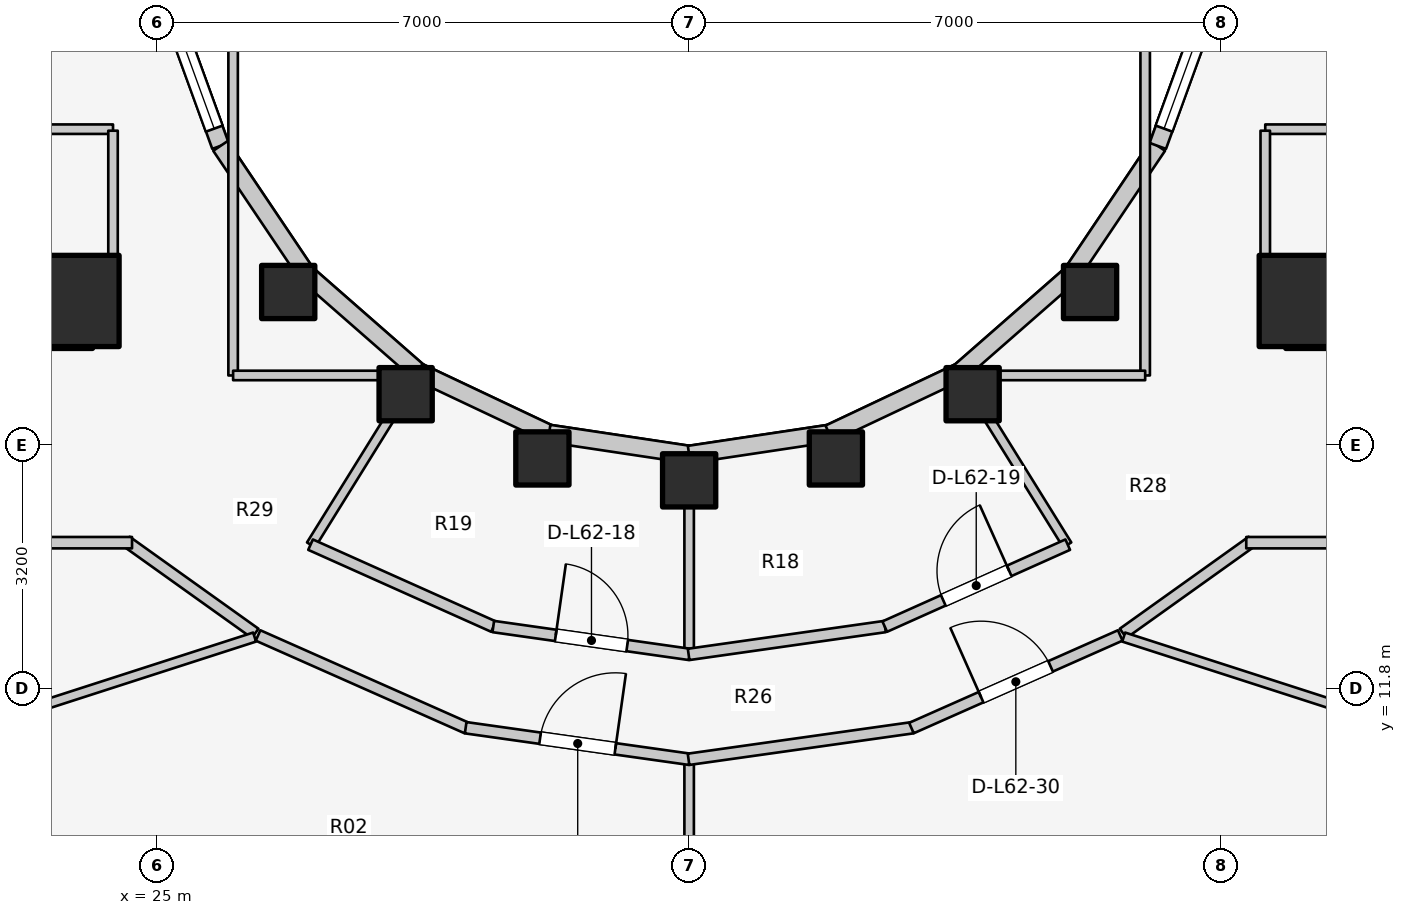
"""IFC4 building model, lengths in metres.
Left out: names, types, materials, properties, quantities, classifications, styles, units other than length and angle.
Written with IfcOpenShell. Run it as: python <this file> out.ifc"""

import sys

from ifc_helpers import new_model, si_unit, direction, frame, frame_2d, origin, origin_2d, place, context, subcontext, project, spatial, rectangle, extrude, element, fill, save


model = new_model("IFC4")
c1 = context("Model", 3, precision=1e-05, world=origin(), true_north=direction((0.0, 1.0)))
c2 = subcontext(c1, "Body", "Model", "MODEL_VIEW")
j1 = project(units=[si_unit("LENGTHUNIT", "METRE"), si_unit("PLANEANGLEUNIT", "RADIAN")], contexts=[c1])
p1 = place(None, origin())
s1 = spatial("IfcSite", under=j1, at=p1, CompositionType="ELEMENT")
p2 = place(p1, origin())
s2 = spatial("IfcBuilding", under=s1, at=p2, CompositionType="ELEMENT")
p3 = place(p2, frame((0.0, 0.0, 204.7)))
s3 = spatial("IfcBuildingStorey", under=s2, at=p3, CompositionType="ELEMENT", Elevation=204.7)
for number, where, z_axis, x_axis in (
    (1, (19.65, 16.55, 0.0), (0.0, 0.0, 1.0), (1.0, 0.0, 0.0)),
    (2, (39.85, 16.55, 0.0), (0.0, 0.0, 1.0), (1.0, 0.0, 0.0)),
):
    element("IfcWall", number, at=place(p3, frame(where, z_axis=z_axis, x_axis=x_axis)), inside=s3, PredefinedType="SHEAR", context=c2, shape_type="SweptSolid", body=[
        extrude(rectangle(XDim=4.5, YDim=0.55, at=frame_2d((2.25, 0.0))), origin(), (0.0, 0.0, 1.0), 3.1),
    ])
for number, where, z_axis, x_axis in (
    (3, (23.9, 16.9, 0.0), (0.0, 0.0, 1.0), (1.0, 0.0, 0.0)),
    (4, (40.1, 16.9, 0.0), (0.0, 0.0, 1.0), (1.0, 0.0, 0.0)),
):
    element("IfcColumn", number, at=place(p3, frame(where, z_axis=z_axis, x_axis=x_axis)), inside=s3, PredefinedType="COLUMN", context=c2, shape_type="SweptSolid", body=[
        extrude(rectangle(XDim=1.2, YDim=1.2, at=origin_2d()), origin(), (0.0, 0.0, 1.0), 3.1),
    ])
for number, where, z_axis, x_axis in (
    (5, (26.725, 17.018, 0.0), (0.0, 0.0, 1.0), (1.0, 0.0, 0.0)),
    (6, (28.27, 15.673, 0.0), (0.0, 0.0, 1.0), (1.0, 0.0, 0.0)),
    (7, (30.069, 14.828, 0.0), (0.0, 0.0, 1.0), (1.0, 0.0, 0.0)),
    (8, (32.0, 14.54, 0.0), (0.0, 0.0, 1.0), (1.0, 0.0, 0.0)),
    (9, (33.931, 14.828, 0.0), (0.0, 0.0, 1.0), (1.0, 0.0, 0.0)),
    (10, (35.73, 15.673, 0.0), (0.0, 0.0, 1.0), (1.0, 0.0, 0.0)),
    (11, (37.275, 17.018, 0.0), (0.0, 0.0, 1.0), (1.0, 0.0, 0.0)),
):
    element("IfcColumn", number, at=place(p3, frame(where, z_axis=z_axis, x_axis=x_axis)), inside=s3, PredefinedType="COLUMN", context=c2, shape_type="SweptSolid", body=[
        extrude(rectangle(XDim=0.7, YDim=0.7, at=origin_2d()), origin(), (0.0, 0.0, 1.0), 3.1),
    ])
p4 = place(p3, frame((25.123, 20.898, 0.0), z_axis=(0.0, 0.0, 1.0), x_axis=(0.341423187295, -0.93990968033, 0.0)))
e12 = element("IfcWall", 12, at=p4, inside=s3, PredefinedType="STANDARD", context=c2, shape_type="SweptSolid", body=[
    extrude(rectangle(XDim=2.084, YDim=0.23, at=frame_2d((1.042, 0.0))), origin(), (0.0, 0.0, 1.0), 2.84),
])
p5 = place(p4, frame((0.242, 0.0, 0.85)))
e13 = element("IfcOpeningElement", 13, at=p5, cuts=e12, PredefinedType="OPENING", context=c2, shape_type="SweptSolid", body=[
    extrude(rectangle(XDim=1.6, YDim=1.65, at=frame_2d((0.8, 0.825))), frame((0.0, 0.125, 0.0), z_axis=(0.0, -1.0, 0.0), x_axis=(1.0, 0.0, 0.0)), (0.0, 0.0, 1.0), 0.25),
])
p6 = place(p3, frame((25.834, 18.94, 0.0), z_axis=(0.0, 0.0, 1.0), x_axis=(0.558197800898, -0.829707909492, 0.0)))
e14 = element("IfcWall", 14, at=p6, inside=s3, PredefinedType="STANDARD", context=c2, shape_type="SweptSolid", body=[
    extrude(rectangle(XDim=2.027, YDim=0.23, at=frame_2d((1.013, 0.0))), origin(), (0.0, 0.0, 1.0), 2.16),
])
p7 = place(p3, frame((26.965, 17.258, 0.0), z_axis=(0.0, 0.0, 1.0), x_axis=(0.752576694707, -0.658504607869, 0.0)))
e15 = element("IfcWall", 15, at=p7, inside=s3, PredefinedType="STANDARD", context=c2, shape_type="SweptSolid", body=[
    extrude(rectangle(XDim=1.959, YDim=0.23, at=frame_2d((0.98, 0.0))), origin(), (0.0, 0.0, 1.0), 2.16),
])
p8 = place(p3, frame((28.44, 15.968, 0.0), z_axis=(0.0, 0.0, 1.0), x_axis=(0.904179699603, -0.427152280606, 0.0)))
e16 = element("IfcWall", 16, at=p8, inside=s3, PredefinedType="STANDARD", context=c2, shape_type="SweptSolid", body=[
    extrude(rectangle(XDim=1.899, YDim=0.23, at=frame_2d((0.95, 0.0))), origin(), (0.0, 0.0, 1.0), 2.16),
])
for number, where, z_axis, x_axis in (
    (17, (30.157, 15.157, 0.0), (0.0, 0.0, 1.0), (0.989, -0.149, 0.0)),
    (18, (32.0, 14.88, 0.0), (0.0, 0.0, 1.0), (0.989, 0.149, 0.0)),
):
    element("IfcWall", number, at=place(p3, frame(where, z_axis=z_axis, x_axis=x_axis)), inside=s3, PredefinedType="STANDARD", context=c2, shape_type="SweptSolid", body=[
        extrude(rectangle(XDim=1.864, YDim=0.23, at=frame_2d((0.932, 0.0))), origin(), (0.0, 0.0, 1.0), 2.16),
    ])
p9 = place(p3, frame((33.843, 15.157, 0.0), z_axis=(0.0, 0.0, 1.0), x_axis=(0.904179699603, 0.427152280606, 0.0)))
e19 = element("IfcWall", 19, at=p9, inside=s3, PredefinedType="STANDARD", context=c2, shape_type="SweptSolid", body=[
    extrude(rectangle(XDim=1.899, YDim=0.23, at=frame_2d((0.95, 0.0))), origin(), (0.0, 0.0, 1.0), 2.16),
])
p10 = place(p3, frame((35.56, 15.968, 0.0), z_axis=(0.0, 0.0, 1.0), x_axis=(0.752576694707, 0.658504607869, 0.0)))
e20 = element("IfcWall", 20, at=p10, inside=s3, PredefinedType="STANDARD", context=c2, shape_type="SweptSolid", body=[
    extrude(rectangle(XDim=1.959, YDim=0.23, at=frame_2d((0.98, 0.0))), origin(), (0.0, 0.0, 1.0), 2.16),
])
p11 = place(p3, frame((37.035, 17.258, 0.0), z_axis=(0.0, 0.0, 1.0), x_axis=(0.558197800898, 0.829707909492, 0.0)))
e21 = element("IfcWall", 21, at=p11, inside=s3, PredefinedType="STANDARD", context=c2, shape_type="SweptSolid", body=[
    extrude(rectangle(XDim=2.027, YDim=0.23, at=frame_2d((1.013, 0.0))), origin(), (0.0, 0.0, 1.0), 2.16),
])
p12 = place(p3, frame((38.166, 18.94, 0.0), z_axis=(0.0, 0.0, 1.0), x_axis=(0.341423187295, 0.93990968033, 0.0)))
e22 = element("IfcWall", 22, at=p12, inside=s3, PredefinedType="STANDARD", context=c2, shape_type="SweptSolid", body=[
    extrude(rectangle(XDim=2.084, YDim=0.23, at=frame_2d((1.042, 0.0))), origin(), (0.0, 0.0, 1.0), 2.84),
])
p13 = place(p12, frame((0.242, 0.0, 0.85)))
e23 = element("IfcOpeningElement", 23, at=p13, cuts=e22, PredefinedType="OPENING", context=c2, shape_type="SweptSolid", body=[
    extrude(rectangle(XDim=1.6, YDim=1.65, at=frame_2d((0.8, 0.825))), frame((0.0, 0.125, 0.0), z_axis=(0.0, -1.0, 0.0), x_axis=(1.0, 0.0, 0.0)), (0.0, 0.0, 1.0), 0.25),
])
p14 = place(p3, frame((20.13, 9.823, 0.0), z_axis=(0.0, 0.0, 1.0), x_axis=(0.965213026382, -0.261464746576, 0.0)))
e24 = element("IfcWall", 24, at=p14, inside=s3, PredefinedType="STANDARD", context=c2, shape_type="SweptSolid", body=[
    extrude(rectangle(XDim=5.001, YDim=0.26, at=frame_2d((2.5, 0.0))), origin(), (0.0, 0.0, 1.0), 2.88),
])
p15 = place(p14, frame((1.9, 0.0, 0.0)))
e25 = element("IfcOpeningElement", 25, at=p15, cuts=e24, PredefinedType="OPENING", context=c2, shape_type="SweptSolid", body=[
    extrude(rectangle(XDim=1.2, YDim=2.2, at=frame_2d((0.6, 1.1))), frame((0.0, 0.14, 0.0), z_axis=(0.0, -1.0, 0.0), x_axis=(1.0, 0.0, 0.0)), (0.0, 0.0, 1.0), 0.28),
])
p16 = place(p3, frame((39.043, 8.515, 0.0), z_axis=(0.0, 0.0, 1.0), x_axis=(0.965213026382, 0.261464746576, 0.0)))
e26 = element("IfcWall", 26, at=p16, inside=s3, PredefinedType="STANDARD", context=c2, shape_type="SweptSolid", body=[
    extrude(rectangle(XDim=5.001, YDim=0.26, at=frame_2d((2.5, 0.0))), origin(), (0.0, 0.0, 1.0), 2.88),
])
p17 = place(p16, frame((1.9, 0.0, 0.0)))
e27 = element("IfcOpeningElement", 27, at=p17, cuts=e26, PredefinedType="OPENING", context=c2, shape_type="SweptSolid", body=[
    extrude(rectangle(XDim=1.2, YDim=2.2, at=frame_2d((0.6, 1.1))), frame((0.0, 0.14, 0.0), z_axis=(0.0, -1.0, 0.0), x_axis=(1.0, 0.0, 0.0)), (0.0, 0.0, 1.0), 0.28),
])
p18 = place(p3, frame((19.55, 19.16, 0.0), z_axis=(0.0, 0.0, 1.0), x_axis=(1.0, 0.0, 0.0)))
e28 = element("IfcWall", 28, at=p18, inside=s3, PredefinedType="PARTITIONING", context=c2, shape_type="SweptSolid", body=[
    extrude(rectangle(XDim=4.87, YDim=0.125, at=frame_2d((2.435, 0.0))), origin(), (0.0, 0.0, 1.0), 2.12),
])
p19 = place(p18, frame((2.272, 0.0, 0.0)))
e29 = element("IfcOpeningElement", 29, at=p19, cuts=e28, PredefinedType="OPENING", context=c2, shape_type="SweptSolid", body=[
    extrude(rectangle(XDim=0.85, YDim=2.05, at=frame_2d((0.425, 1.025))), frame((0.0, 0.073, 0.0), z_axis=(0.0, -1.0, 0.0), x_axis=(1.0, 0.0, 0.0)), (0.0, 0.0, 1.0), 0.145),
])
p20 = place(p3, frame((24.42, 17.1, 0.0), z_axis=(0.0, 0.0, 1.0), x_axis=(0.0, 1.0, 0.0)))
e30 = element("IfcWall", 30, at=p20, inside=s3, PredefinedType="PARTITIONING", context=c2, shape_type="SweptSolid", body=[
    extrude(rectangle(XDim=2.04, YDim=0.125, at=frame_2d((1.02, 0.0))), origin(), (0.0, 0.0, 1.0), 2.232),
])
p21 = place(p3, frame((39.58, 19.16, 0.0), z_axis=(0.0, 0.0, 1.0), x_axis=(1.0, 0.0, 0.0)))
e31 = element("IfcWall", 31, at=p21, inside=s3, PredefinedType="PARTITIONING", context=c2, shape_type="SweptSolid", body=[
    extrude(rectangle(XDim=4.87, YDim=0.125, at=frame_2d((2.435, 0.0))), origin(), (0.0, 0.0, 1.0), 2.12),
])
p22 = place(p21, frame((1.748, 0.0, 0.0)))
e32 = element("IfcOpeningElement", 32, at=p22, cuts=e31, PredefinedType="OPENING", context=c2, shape_type="SweptSolid", body=[
    extrude(rectangle(XDim=0.85, YDim=2.05, at=frame_2d((0.425, 1.025))), frame((0.0, 0.073, 0.0), z_axis=(0.0, -1.0, 0.0), x_axis=(1.0, 0.0, 0.0)), (0.0, 0.0, 1.0), 0.145),
])
p23 = place(p3, frame((39.58, 17.1, 0.0), z_axis=(0.0, 0.0, 1.0), x_axis=(0.0, 1.0, 0.0)))
e33 = element("IfcWall", 33, at=p23, inside=s3, PredefinedType="PARTITIONING", context=c2, shape_type="SweptSolid", body=[
    extrude(rectangle(XDim=2.04, YDim=0.125, at=frame_2d((1.02, 0.0))), origin(), (0.0, 0.0, 1.0), 2.232),
])
p24 = place(p3, frame((28.45, 15.985, 0.0), z_axis=(0.0, 0.0, 1.0), x_axis=(-0.527527080983, -0.849538215049, 0.0)))
e34 = element("IfcWall", 34, at=p24, inside=s3, PredefinedType="PARTITIONING", context=c2, shape_type="SweptSolid", body=[
    extrude(rectangle(XDim=2.701, YDim=0.125, at=frame_2d((1.351, 0.0))), origin(), (0.0, 0.0, 1.0), 2.376),
])
p25 = place(p3, frame((32.0, 14.9, 0.0), z_axis=(0.0, 0.0, 1.0), x_axis=(0.0, -1.0, 0.0)))
e35 = element("IfcWall", 35, at=p25, inside=s3, PredefinedType="PARTITIONING", context=c2, shape_type="SweptSolid", body=[
    extrude(rectangle(XDim=2.65, YDim=0.125, at=frame_2d((1.325, 0.0))), origin(), (0.0, 0.0, 1.0), 2.376),
])
p26 = place(p3, frame((35.55, 15.985, 0.0), z_axis=(0.0, 0.0, 1.0), x_axis=(0.527527080983, -0.849538215049, 0.0)))
e36 = element("IfcWall", 36, at=p26, inside=s3, PredefinedType="PARTITIONING", context=c2, shape_type="SweptSolid", body=[
    extrude(rectangle(XDim=2.701, YDim=0.125, at=frame_2d((1.351, 0.0))), origin(), (0.0, 0.0, 1.0), 2.376),
])
p27 = place(p3, frame((27.019, 13.694, 0.0), z_axis=(0.0, 0.0, 1.0), x_axis=(0.912628408652, -0.408790151203, 0.0)))
e37 = element("IfcWall", 37, at=p27, inside=s3, PredefinedType="PARTITIONING", context=c2, shape_type="SweptSolid", body=[
    extrude(rectangle(XDim=2.638, YDim=0.15, at=frame_2d((1.319, 0.0))), origin(), (0.0, 0.0, 1.0), 2.376),
])
p28 = place(p3, frame((29.423, 12.617, 0.0), z_axis=(0.0, 0.0, 1.0), x_axis=(0.990078185178, -0.140517569133, 0.0)))
e38 = element("IfcWall", 38, at=p28, inside=s3, PredefinedType="PARTITIONING", context=c2, shape_type="SweptSolid", body=[
    extrude(rectangle(XDim=2.61, YDim=0.15, at=frame_2d((1.305, 0.0))), origin(), (0.0, 0.0, 1.0), 2.376),
])
p29 = place(p28, frame((0.83, 0.0, 0.0)))
e39 = element("IfcOpeningElement", 39, at=p29, cuts=e38, PredefinedType="OPENING", context=c2, shape_type="SweptSolid", body=[
    extrude(rectangle(XDim=0.95, YDim=2.1, at=frame_2d((0.475, 1.05))), frame((0.0, 0.085, 0.0), z_axis=(0.0, -1.0, 0.0), x_axis=(1.0, 0.0, 0.0)), (0.0, 0.0, 1.0), 0.17),
])
p30 = place(p3, frame((31.993, 12.25, 0.0), z_axis=(0.0, 0.0, 1.0), x_axis=(0.990078185178, 0.140517569133, 0.0)))
e40 = element("IfcWall", 40, at=p30, inside=s3, PredefinedType="PARTITIONING", context=c2, shape_type="SweptSolid", body=[
    extrude(rectangle(XDim=2.61, YDim=0.15, at=frame_2d((1.305, 0.0))), origin(), (0.0, 0.0, 1.0), 2.376),
])
p31 = place(p3, frame((34.573, 12.616, 0.0), z_axis=(0.0, 0.0, 1.0), x_axis=(0.912628408652, 0.408790151203, 0.0)))
e41 = element("IfcWall", 41, at=p31, inside=s3, PredefinedType="PARTITIONING", context=c2, shape_type="SweptSolid", body=[
    extrude(rectangle(XDim=2.638, YDim=0.15, at=frame_2d((1.319, 0.0))), origin(), (0.0, 0.0, 1.0), 2.376),
])
p32 = place(p31, frame((0.844, 0.0, 0.0)))
e42 = element("IfcOpeningElement", 42, at=p32, cuts=e41, PredefinedType="OPENING", context=c2, shape_type="SweptSolid", body=[
    extrude(rectangle(XDim=0.95, YDim=2.1, at=frame_2d((0.475, 1.05))), frame((0.0, 0.085, 0.0), z_axis=(0.0, -1.0, 0.0), x_axis=(1.0, 0.0, 0.0)), (0.0, 0.0, 1.0), 0.17),
])
p33 = place(p3, frame((26.0, 15.92, 0.0), z_axis=(0.0, 0.0, 1.0), x_axis=(0.0, 1.0, 0.0)))
e43 = element("IfcWall", 43, at=p33, inside=s3, PredefinedType="PARTITIONING", context=c2, shape_type="SweptSolid", body=[
    extrude(rectangle(XDim=4.28, YDim=0.125, at=frame_2d((2.14, 0.0))), origin(), (0.0, 0.0, 1.0), 2.232),
])
p34 = place(p3, frame((26.0, 15.92, 0.0), z_axis=(0.0, 0.0, 1.0), x_axis=(1.0, 0.0, 0.0)))
e44 = element("IfcWall", 44, at=p34, inside=s3, PredefinedType="PARTITIONING", context=c2, shape_type="SweptSolid", body=[
    extrude(rectangle(XDim=2.6, YDim=0.125, at=frame_2d((1.3, 0.0))), origin(), (0.0, 0.0, 1.0), 2.232),
])
p35 = place(p3, frame((38.0, 15.92, 0.0), z_axis=(0.0, 0.0, 1.0), x_axis=(0.0, 1.0, 0.0)))
e45 = element("IfcWall", 45, at=p35, inside=s3, PredefinedType="PARTITIONING", context=c2, shape_type="SweptSolid", body=[
    extrude(rectangle(XDim=4.28, YDim=0.125, at=frame_2d((2.14, 0.0))), origin(), (0.0, 0.0, 1.0), 2.232),
])
p36 = place(p3, frame((35.4, 15.92, 0.0), z_axis=(0.0, 0.0, 1.0), x_axis=(1.0, 0.0, 0.0)))
e46 = element("IfcWall", 46, at=p36, inside=s3, PredefinedType="PARTITIONING", context=c2, shape_type="SweptSolid", body=[
    extrude(rectangle(XDim=2.6, YDim=0.125, at=frame_2d((1.3, 0.0))), origin(), (0.0, 0.0, 1.0), 2.232),
])
p37 = place(p3, frame((26.29, 12.527, 0.0), z_axis=(0.0, 0.0, 1.0), x_axis=(-0.813780999276, 0.581171648669, 0.0)))
e47 = element("IfcWall", 47, at=p37, inside=s3, PredefinedType="PARTITIONING", context=c2, shape_type="SweptSolid", body=[
    extrude(rectangle(XDim=2.082, YDim=0.15, at=frame_2d((1.041, 0.0))), origin(), (0.0, 0.0, 1.0), 2.376),
])
p38 = place(p3, frame((17.15, 13.72, 0.0), z_axis=(0.0, 0.0, 1.0), x_axis=(1.0, 0.0, 0.0)))
e48 = element("IfcWall", 48, at=p38, inside=s3, PredefinedType="PARTITIONING", context=c2, shape_type="SweptSolid", body=[
    extrude(rectangle(XDim=7.52, YDim=0.15, at=frame_2d((3.76, 0.0))), origin(), (0.0, 0.0, 1.0), 2.376),
])
p39 = place(p38, frame((1.3, 0.0, 0.0)))
e49 = element("IfcOpeningElement", 49, at=p39, cuts=e48, PredefinedType="OPENING", context=c2, shape_type="SweptSolid", body=[
    extrude(rectangle(XDim=0.9, YDim=2.1, at=frame_2d((0.45, 1.05))), frame((0.0, 0.085, 0.0), z_axis=(0.0, -1.0, 0.0), x_axis=(1.0, 0.0, 0.0)), (0.0, 0.0, 1.0), 0.17),
])
p40 = place(p3, frame((37.71, 12.527, 0.0), z_axis=(0.0, 0.0, 1.0), x_axis=(0.813780999276, 0.581171648669, 0.0)))
e50 = element("IfcWall", 50, at=p40, inside=s3, PredefinedType="PARTITIONING", context=c2, shape_type="SweptSolid", body=[
    extrude(rectangle(XDim=2.082, YDim=0.15, at=frame_2d((1.041, 0.0))), origin(), (0.0, 0.0, 1.0), 2.376),
])
p41 = place(p3, frame((39.33, 13.72, 0.0), z_axis=(0.0, 0.0, 1.0), x_axis=(1.0, 0.0, 0.0)))
e51 = element("IfcWall", 51, at=p41, inside=s3, PredefinedType="PARTITIONING", context=c2, shape_type="SweptSolid", body=[
    extrude(rectangle(XDim=7.52, YDim=0.15, at=frame_2d((3.76, 0.0))), origin(), (0.0, 0.0, 1.0), 2.376),
])
p42 = place(p41, frame((5.22, 0.0, 0.0)))
e52 = element("IfcOpeningElement", 52, at=p42, cuts=e51, PredefinedType="OPENING", context=c2, shape_type="SweptSolid", body=[
    extrude(rectangle(XDim=0.9, YDim=2.1, at=frame_2d((0.45, 1.05))), frame((0.0, 0.085, 0.0), z_axis=(0.0, -1.0, 0.0), x_axis=(1.0, 0.0, 0.0)), (0.0, 0.0, 1.0), 0.17),
])
p43 = place(p3, frame((26.283, 12.478, 0.0), z_axis=(0.0, 0.0, 1.0), x_axis=(-0.951711719757, -0.306993163568, 0.0)))
e53 = element("IfcWall", 53, at=p43, inside=s3, PredefinedType="PARTITIONING", context=c2, shape_type="SweptSolid", body=[
    extrude(rectangle(XDim=5.934, YDim=0.125, at=frame_2d((2.967, 0.0))), origin(), (0.0, 0.0, 1.0), 2.376),
])
p44 = place(p3, frame((32.0, 10.815, 0.0), z_axis=(0.0, 0.0, 1.0), x_axis=(0.0, -1.0, 0.0)))
e54 = element("IfcWall", 54, at=p44, inside=s3, PredefinedType="PARTITIONING", context=c2, shape_type="SweptSolid", body=[
    extrude(rectangle(XDim=1.715, YDim=0.125, at=frame_2d((0.857, 0.0))), origin(), (0.0, 0.0, 1.0), 2.376),
])
p45 = place(p3, frame((37.717, 12.478, 0.0), z_axis=(0.0, 0.0, 1.0), x_axis=(0.951711719757, -0.306993163568, 0.0)))
e55 = element("IfcWall", 55, at=p45, inside=s3, PredefinedType="PARTITIONING", context=c2, shape_type="SweptSolid", body=[
    extrude(rectangle(XDim=5.934, YDim=0.125, at=frame_2d((2.967, 0.0))), origin(), (0.0, 0.0, 1.0), 2.376),
])
p46 = place(p3, frame((26.328, 12.499, 0.0), z_axis=(0.0, 0.0, 1.0), x_axis=(0.914139569865, -0.405399613724, 0.0)))
e56 = element("IfcWall", 56, at=p46, inside=s3, PredefinedType="PARTITIONING", context=c2, shape_type="SweptSolid", body=[
    extrude(rectangle(XDim=3.005, YDim=0.15, at=frame_2d((1.502, 0.0))), origin(), (0.0, 0.0, 1.0), 2.376),
])
p47 = place(p3, frame((29.06, 11.285, 0.0), z_axis=(0.0, 0.0, 1.0), x_axis=(0.99022315503, -0.139492305317, 0.0)))
e57 = element("IfcWall", 57, at=p47, inside=s3, PredefinedType="PARTITIONING", context=c2, shape_type="SweptSolid", body=[
    extrude(rectangle(XDim=2.977, YDim=0.15, at=frame_2d((1.489, 0.0))), origin(), (0.0, 0.0, 1.0), 2.376),
])
p48 = place(p47, frame((0.989, 0.0, 0.0)))
e58 = element("IfcOpeningElement", 58, at=p48, cuts=e57, PredefinedType="OPENING", context=c2, shape_type="SweptSolid", body=[
    extrude(rectangle(XDim=1.0, YDim=2.1, at=frame_2d((0.5, 1.05))), frame((0.0, 0.085, 0.0), z_axis=(0.0, -1.0, 0.0), x_axis=(1.0, 0.0, 0.0)), (0.0, 0.0, 1.0), 0.17),
])
p49 = place(p3, frame((31.992, 10.87, 0.0), z_axis=(0.0, 0.0, 1.0), x_axis=(0.99022315503, 0.139492305317, 0.0)))
e59 = element("IfcWall", 59, at=p49, inside=s3, PredefinedType="PARTITIONING", context=c2, shape_type="SweptSolid", body=[
    extrude(rectangle(XDim=2.977, YDim=0.15, at=frame_2d((1.489, 0.0))), origin(), (0.0, 0.0, 1.0), 2.376),
])
p50 = place(p3, frame((34.925, 11.281, 0.0), z_axis=(0.0, 0.0, 1.0), x_axis=(0.914139569865, 0.405399613724, 0.0)))
e60 = element("IfcWall", 60, at=p50, inside=s3, PredefinedType="PARTITIONING", context=c2, shape_type="SweptSolid", body=[
    extrude(rectangle(XDim=3.005, YDim=0.15, at=frame_2d((1.502, 0.0))), origin(), (0.0, 0.0, 1.0), 2.376),
])
p51 = place(p50, frame((1.002, 0.0, 0.0)))
e61 = element("IfcOpeningElement", 61, at=p51, cuts=e60, PredefinedType="OPENING", context=c2, shape_type="SweptSolid", body=[
    extrude(rectangle(XDim=1.0, YDim=2.1, at=frame_2d((0.5, 1.05))), frame((0.0, 0.085, 0.0), z_axis=(0.0, -1.0, 0.0), x_axis=(1.0, 0.0, 0.0)), (0.0, 0.0, 1.0), 0.17),
])
p52 = place(p5, origin())
e62 = element("IfcWindow", 62, at=p52, inside=s3, PartitioningType="SINGLE_PANEL", PredefinedType="WINDOW", context=c2, shape_type="SweptSolid", body=[
    extrude(rectangle(XDim=1.6, YDim=1.65, at=frame_2d((0.8, 0.825))), frame((0.0, 0.03, 0.0), z_axis=(0.0, -1.0, 0.0), x_axis=(1.0, 0.0, 0.0)), (0.0, 0.0, 1.0), 0.06),
])
fill(e13, e62)
p53 = place(p13, origin())
e63 = element("IfcWindow", 63, at=p53, inside=s3, PartitioningType="SINGLE_PANEL", PredefinedType="WINDOW", context=c2, shape_type="SweptSolid", body=[
    extrude(rectangle(XDim=1.6, YDim=1.65, at=frame_2d((0.8, 0.825))), frame((0.0, 0.03, 0.0), z_axis=(0.0, -1.0, 0.0), x_axis=(1.0, 0.0, 0.0)), (0.0, 0.0, 1.0), 0.06),
])
fill(e23, e63)
p54 = place(p29, origin())
e64 = element("IfcDoor", 64, at=p54, inside=s3, OperationType="SINGLE_SWING_LEFT", PredefinedType="DOOR", context=c2, shape_type="SweptSolid", body=[
    extrude(rectangle(XDim=0.95, YDim=2.1, at=frame_2d((0.475, 1.05))), frame((0.0, 0.025, 0.0), z_axis=(0.0, -1.0, 0.0), x_axis=(1.0, 0.0, 0.0)), (0.0, 0.0, 1.0), 0.05),
])
fill(e39, e64)
p55 = place(p32, origin())
e65 = element("IfcDoor", 65, at=p55, inside=s3, OperationType="SINGLE_SWING_RIGHT", PredefinedType="DOOR", context=c2, shape_type="SweptSolid", body=[
    extrude(rectangle(XDim=0.95, YDim=2.1, at=frame_2d((0.475, 1.05))), frame((0.0, 0.025, 0.0), z_axis=(0.0, -1.0, 0.0), x_axis=(1.0, 0.0, 0.0)), (0.0, 0.0, 1.0), 0.05),
])
fill(e42, e65)
p56 = place(p48, origin())
e66 = element("IfcDoor", 66, at=p56, inside=s3, OperationType="SINGLE_SWING_RIGHT", PredefinedType="DOOR", context=c2, shape_type="SweptSolid", body=[
    extrude(rectangle(XDim=1.0, YDim=2.1, at=frame_2d((0.5, 1.05))), frame((0.0, 0.025, 0.0), z_axis=(0.0, -1.0, 0.0), x_axis=(1.0, 0.0, 0.0)), (0.0, 0.0, 1.0), 0.05),
])
fill(e58, e66)
p57 = place(p51, origin())
e67 = element("IfcDoor", 67, at=p57, inside=s3, OperationType="SINGLE_SWING_LEFT", PredefinedType="DOOR", context=c2, shape_type="SweptSolid", body=[
    extrude(rectangle(XDim=1.0, YDim=2.1, at=frame_2d((0.5, 1.05))), frame((0.0, 0.025, 0.0), z_axis=(0.0, -1.0, 0.0), x_axis=(1.0, 0.0, 0.0)), (0.0, 0.0, 1.0), 0.05),
])
fill(e61, e67)
save(model, sys.argv[1])
